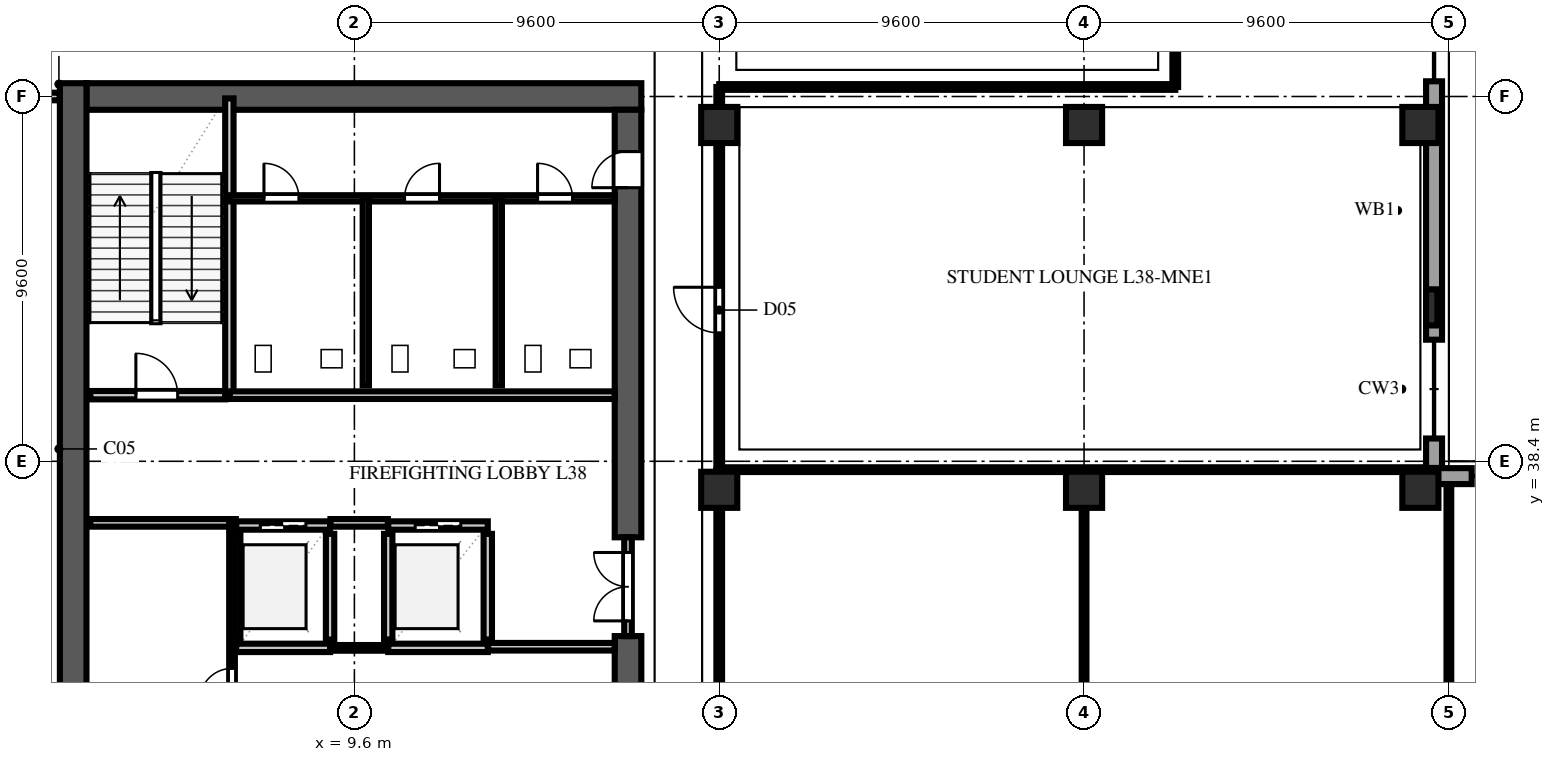
"""IFC4 building model, lengths in metres.
Left out: names, types, materials, properties, quantities, classifications, styles, units other than length and angle.
Written with IfcOpenShell. Run it as: python <this file> out.ifc"""

import sys

from ifc_helpers import new_model, si_unit, direction, frame, frame_2d, origin, origin_2d, place, context, subcontext, project, spatial, rectangle, extrude, element, fill, save


model = new_model("IFC4")
c1 = context("Model", 3, precision=1e-05, world=origin(), true_north=direction((0.0, 1.0)))
c2 = subcontext(c1, "Body", "Model", "MODEL_VIEW")
j1 = project(units=[si_unit("LENGTHUNIT", "METRE"), si_unit("PLANEANGLEUNIT", "RADIAN")], contexts=[c1])
p1 = place(None, origin())
s1 = spatial("IfcSite", under=j1, at=p1, CompositionType="ELEMENT")
p2 = place(p1, origin())
s2 = spatial("IfcBuilding", under=s1, at=p2, CompositionType="ELEMENT")
p3 = place(p2, frame((0.0, 0.0, 150.8)))
s3 = spatial("IfcBuildingStorey", under=s2, at=p3, CompositionType="ELEMENT", Elevation=150.8)
p4 = place(p3, frame((2.55, 48.0, 0.0), z_axis=(0.0, 0.0, 1.0), x_axis=(1.0, 0.0, 0.0)))
e1 = element("IfcWall", 1, at=p4, inside=s3, PredefinedType="SHEAR", context=c2, shape_type="SweptSolid", body=[
    extrude(rectangle(XDim=14.6, YDim=0.7, at=frame_2d((7.3, 0.0))), origin(), (0.0, 0.0, 1.0), 4.94),
])
p5 = place(p3, frame((2.2, 9.25, 0.0), z_axis=(0.0, 0.0, 1.0), x_axis=(0.0, 1.0, 0.0)))
e2 = element("IfcWall", 2, at=p5, inside=s3, PredefinedType="SHEAR", context=c2, shape_type="SweptSolid", body=[
    extrude(rectangle(XDim=39.1, YDim=0.7, at=frame_2d((19.55, 0.0))), origin(), (0.0, 0.0, 1.0), 4.94),
])
p6 = place(p3, frame((16.8, 26.0, 0.0), z_axis=(0.0, 0.0, 1.0), x_axis=(0.0, 1.0, 0.0)))
e3 = element("IfcWall", 3, at=p6, inside=s3, PredefinedType="SHEAR", context=c2, shape_type="SweptSolid", body=[
    extrude(rectangle(XDim=7.8, YDim=0.7, at=frame_2d((3.9, 0.0))), origin(), (0.0, 0.0, 1.0), 4.94),
])
p7 = place(p3, frame((16.8, 36.4, 0.0), z_axis=(0.0, 0.0, 1.0), x_axis=(0.0, 1.0, 0.0)))
e4 = element("IfcWall", 4, at=p7, inside=s3, PredefinedType="SHEAR", context=c2, shape_type="SweptSolid", body=[
    extrude(rectangle(XDim=11.25, YDim=0.7, at=frame_2d((5.625, 0.0))), origin(), (0.0, 0.0, 1.0), 4.94),
])
p8 = place(p7, frame((9.2, 0.0, 0.0)))
e5 = element("IfcOpeningElement", 5, at=p8, cuts=e4, PredefinedType="OPENING", context=c2, shape_type="SweptSolid", body=[
    extrude(rectangle(XDim=0.95, YDim=2.15, at=frame_2d((0.475, 1.075))), frame((0.0, 0.362, 0.0), z_axis=(0.0, -1.0, 0.0), x_axis=(1.0, 0.0, 0.0)), (0.0, 0.0, 1.0), 0.724),
])
for number, where, z_axis, x_axis in (
    (6, (19.2, 37.65, 0.0), (0.0, 0.0, 1.0), (1.0, 0.0, 0.0)),
    (7, (19.2, 47.25, 0.0), (0.0, 0.0, 1.0), (1.0, 0.0, 0.0)),
    (8, (28.8, 37.65, 0.0), (0.0, 0.0, 1.0), (1.0, 0.0, 0.0)),
    (9, (28.8, 47.25, 0.0), (0.0, 0.0, 1.0), (1.0, 0.0, 0.0)),
    (10, (37.65, 37.65, 0.0), (0.0, 0.0, 1.0), (1.0, 0.0, 0.0)),
    (11, (37.65, 47.25, 0.0), (0.0, 0.0, 1.0), (1.0, 0.0, 0.0)),
):
    element("IfcColumn", number, at=place(p3, frame(where, z_axis=z_axis, x_axis=x_axis)), inside=s3, PredefinedType="COLUMN", context=c2, shape_type="SweptSolid", body=[
        extrude(rectangle(XDim=0.95, YDim=0.95, at=origin_2d()), origin(), (0.0, 0.0, 1.0), 5.2),
    ])
p9 = place(p3, frame((37.95, 42.45, 0.0), z_axis=(0.0, 0.0, 1.0), x_axis=(0.0, 1.0, 0.0)))
e12 = element("IfcColumn", 12, at=p9, inside=s3, PredefinedType="PILASTER", context=c2, shape_type="SweptSolid", body=[
    extrude(rectangle(XDim=0.95, YDim=0.3, at=origin_2d()), origin(), (0.0, 0.0, 1.0), 5.2),
])
p10 = place(p3, frame((39.0, 38.01, 0.0), z_axis=(0.0, 0.0, 1.0), x_axis=(-1.0, 0.0, 0.0)))
e13 = element("IfcWall", 13, at=p10, inside=s3, PredefinedType="SOLIDWALL", context=c2, shape_type="SweptSolid", body=[
    extrude(rectangle(XDim=1.2, YDim=0.42, at=frame_2d((0.6, 0.0))), origin(), (0.0, 0.0, 1.0), 4.94),
])
p11 = place(p3, frame((38.01, 38.225, 0.0), z_axis=(0.0, 0.0, 1.0), x_axis=(0.0, 1.0, 0.0)))
e14 = element("IfcWall", 14, at=p11, inside=s3, PredefinedType="SOLIDWALL", context=c2, shape_type="SweptSolid", body=[
    extrude(rectangle(XDim=0.775, YDim=0.42, at=frame_2d((0.387, 0.0))), origin(), (0.0, 0.0, 1.0), 4.94),
])
p12 = place(p3, frame((38.01, 41.6, 0.0), z_axis=(0.0, 0.0, 1.0), x_axis=(0.0, 1.0, 0.0)))
e15 = element("IfcWall", 15, at=p12, inside=s3, PredefinedType="SOLIDWALL", context=c2, shape_type="SweptSolid", body=[
    extrude(rectangle(XDim=6.8, YDim=0.42, at=frame_2d((3.4, 0.0))), origin(), (0.0, 0.0, 1.0), 4.94),
])
p13 = place(p3, frame((2.65, 40.14, 0.0), z_axis=(0.0, 0.0, 1.0), x_axis=(1.0, 0.0, 0.0)))
e16 = element("IfcWall", 16, at=p13, inside=s3, PredefinedType="SOLIDWALL", context=c2, shape_type="SweptSolid", body=[
    extrude(rectangle(XDim=3.55, YDim=0.22, at=frame_2d((1.775, 0.0))), origin(), (0.0, 0.0, 1.0), 4.94),
])
p14 = place(p13, frame((1.2, 0.0, 0.0)))
e17 = element("IfcOpeningElement", 17, at=p14, cuts=e16, PredefinedType="OPENING", context=c2, shape_type="SweptSolid", body=[
    extrude(rectangle(XDim=1.1, YDim=2.2, at=frame_2d((0.55, 1.1))), frame((0.0, 0.122, 0.0), z_axis=(0.0, -1.0, 0.0), x_axis=(1.0, 0.0, 0.0)), (0.0, 0.0, 1.0), 0.244),
])
p15 = place(p3, frame((6.31, 40.14, 0.0), z_axis=(0.0, 0.0, 1.0), x_axis=(0.0, 1.0, 0.0)))
e18 = element("IfcWall", 18, at=p15, inside=s3, PredefinedType="SOLIDWALL", context=c2, shape_type="SweptSolid", body=[
    extrude(rectangle(XDim=7.81, YDim=0.22, at=frame_2d((3.905, 0.0))), origin(), (0.0, 0.0, 1.0), 4.94),
])
for number, where, z_axis, x_axis in (
    (19, (6.49, 33.71, 0.0), (0.0, 0.0, 1.0), (0.0, 1.0, 0.0)),
    (20, (8.96, 33.71, 0.0), (0.0, 0.0, 1.0), (0.0, 1.0, 0.0)),
):
    element("IfcWall", number, at=place(p3, frame(where, z_axis=z_axis, x_axis=x_axis)), inside=s3, PredefinedType="SOLIDWALL", context=c2, shape_type="SweptSolid", body=[
        extrude(rectangle(XDim=2.78, YDim=0.22, at=frame_2d((1.39, 0.0))), origin(), (0.0, 0.0, 1.0), 4.94),
    ])
p16 = place(p3, frame((6.49, 33.49, 0.0), z_axis=(0.0, 0.0, 1.0), x_axis=(1.0, 0.0, 0.0)))
e21 = element("IfcWall", 21, at=p16, inside=s3, PredefinedType="SOLIDWALL", context=c2, shape_type="SweptSolid", body=[
    extrude(rectangle(XDim=2.47, YDim=0.22, at=frame_2d((1.235, 0.0))), origin(), (0.0, 0.0, 1.0), 4.94),
])
p17 = place(p3, frame((6.49, 36.71, 0.0), z_axis=(0.0, 0.0, 1.0), x_axis=(1.0, 0.0, 0.0)))
e22 = element("IfcWall", 22, at=p17, inside=s3, PredefinedType="SOLIDWALL", context=c2, shape_type="SweptSolid", body=[
    extrude(rectangle(XDim=2.47, YDim=0.22, at=frame_2d((1.235, 0.0))), origin(), (0.0, 0.0, 1.0), 4.94),
])
p18 = place(p17, frame((0.635, 0.0, 0.0)))
e23 = element("IfcOpeningElement", 23, at=p18, cuts=e22, PredefinedType="OPENING", context=c2, shape_type="SweptSolid", body=[
    extrude(rectangle(XDim=1.2, YDim=2.2, at=frame_2d((0.6, 1.1))), frame((0.0, 0.122, 0.0), z_axis=(0.0, -1.0, 0.0), x_axis=(1.0, 0.0, 0.0)), (0.0, 0.0, 1.0), 0.244),
])
for number, where, z_axis, x_axis in (
    (24, (10.49, 33.71, 0.0), (0.0, 0.0, 1.0), (0.0, 1.0, 0.0)),
    (25, (13.11, 33.71, 0.0), (0.0, 0.0, 1.0), (0.0, 1.0, 0.0)),
):
    element("IfcWall", number, at=place(p3, frame(where, z_axis=z_axis, x_axis=x_axis)), inside=s3, PredefinedType="SOLIDWALL", context=c2, shape_type="SweptSolid", body=[
        extrude(rectangle(XDim=2.78, YDim=0.22, at=frame_2d((1.39, 0.0))), origin(), (0.0, 0.0, 1.0), 4.94),
    ])
p19 = place(p3, frame((10.49, 33.49, 0.0), z_axis=(0.0, 0.0, 1.0), x_axis=(1.0, 0.0, 0.0)))
e26 = element("IfcWall", 26, at=p19, inside=s3, PredefinedType="SOLIDWALL", context=c2, shape_type="SweptSolid", body=[
    extrude(rectangle(XDim=2.62, YDim=0.22, at=frame_2d((1.31, 0.0))), origin(), (0.0, 0.0, 1.0), 4.94),
])
p20 = place(p3, frame((10.49, 36.71, 0.0), z_axis=(0.0, 0.0, 1.0), x_axis=(1.0, 0.0, 0.0)))
e27 = element("IfcWall", 27, at=p20, inside=s3, PredefinedType="SOLIDWALL", context=c2, shape_type="SweptSolid", body=[
    extrude(rectangle(XDim=2.62, YDim=0.22, at=frame_2d((1.31, 0.0))), origin(), (0.0, 0.0, 1.0), 4.94),
])
p21 = place(p20, frame((0.71, 0.0, 0.0)))
e28 = element("IfcOpeningElement", 28, at=p21, cuts=e27, PredefinedType="OPENING", context=c2, shape_type="SweptSolid", body=[
    extrude(rectangle(XDim=1.2, YDim=2.2, at=frame_2d((0.6, 1.1))), frame((0.0, 0.122, 0.0), z_axis=(0.0, -1.0, 0.0), x_axis=(1.0, 0.0, 0.0)), (0.0, 0.0, 1.0), 0.244),
])
p22 = place(p3, frame((2.65, 36.78, 0.0), z_axis=(0.0, 0.0, 1.0), x_axis=(1.0, 0.0, 0.0)))
e29 = element("IfcWall", 29, at=p22, inside=s3, PredefinedType="SOLIDWALL", context=c2, shape_type="SweptSolid", body=[
    extrude(rectangle(XDim=3.83, YDim=0.2, at=frame_2d((1.915, 0.0))), origin(), (0.0, 0.0, 1.0), 4.94),
])
p23 = place(p3, frame((8.97, 36.78, 0.0), z_axis=(0.0, 0.0, 1.0), x_axis=(1.0, 0.0, 0.0)))
e30 = element("IfcWall", 30, at=p23, inside=s3, PredefinedType="SOLIDWALL", context=c2, shape_type="SweptSolid", body=[
    extrude(rectangle(XDim=1.51, YDim=0.2, at=frame_2d((0.755, 0.0))), origin(), (0.0, 0.0, 1.0), 4.94),
])
p24 = place(p3, frame((13.12, 33.52, 0.0), z_axis=(0.0, 0.0, 1.0), x_axis=(1.0, 0.0, 0.0)))
e31 = element("IfcWall", 31, at=p24, inside=s3, PredefinedType="SOLIDWALL", context=c2, shape_type="SweptSolid", body=[
    extrude(rectangle(XDim=3.33, YDim=0.2, at=frame_2d((1.665, 0.0))), origin(), (0.0, 0.0, 1.0), 4.94),
])
p25 = place(p3, frame((6.32, 40.14, 0.0), z_axis=(0.0, 0.0, 1.0), x_axis=(1.0, 0.0, 0.0)))
e32 = element("IfcWall", 32, at=p25, inside=s3, PredefinedType="SOLIDWALL", context=c2, shape_type="SweptSolid", body=[
    extrude(rectangle(XDim=10.13, YDim=0.2, at=frame_2d((5.065, 0.0))), origin(), (0.0, 0.0, 1.0), 4.94),
])
p26 = place(p3, frame((16.8, 33.8, 0.0), z_axis=(0.0, 0.0, 1.0), x_axis=(0.0, 1.0, 0.0)))
e33 = element("IfcWall", 33, at=p26, inside=s3, PredefinedType="SOLIDWALL", context=c2, shape_type="SweptSolid", body=[
    extrude(rectangle(XDim=2.6, YDim=0.2, at=frame_2d((1.3, 0.0))), origin(), (0.0, 0.0, 1.0), 4.94),
])
p27 = place(p26, frame((0.4, 0.0, 0.0)))
e34 = element("IfcOpeningElement", 34, at=p27, cuts=e33, PredefinedType="OPENING", context=c2, shape_type="SweptSolid", body=[
    extrude(rectangle(XDim=1.8, YDim=2.2, at=frame_2d((0.9, 1.1))), frame((0.0, 0.112, 0.0), z_axis=(0.0, -1.0, 0.0), x_axis=(1.0, 0.0, 0.0)), (0.0, 0.0, 1.0), 0.224),
])
p28 = place(p3, frame((8.965, 33.49, 0.0), z_axis=(0.0, 0.0, 1.0), x_axis=(1.0, 0.0, 0.0)))
e35 = element("IfcWall", 35, at=p28, inside=s3, PredefinedType="PARTITIONING", context=c2, shape_type="SweptSolid", body=[
    extrude(rectangle(XDim=1.52, YDim=0.15, at=frame_2d((0.76, 0.0))), origin(), (0.0, 0.0, 1.0), 4.94),
])
p29 = place(p3, frame((6.38, 17.8, 0.0), z_axis=(0.0, 0.0, 1.0), x_axis=(0.0, 1.0, 0.0)))
e36 = element("IfcWall", 36, at=p29, inside=s3, PredefinedType="PARTITIONING", context=c2, shape_type="SweptSolid", body=[
    extrude(rectangle(XDim=18.98, YDim=0.15, at=frame_2d((9.49, 0.0))), origin(), (0.0, 0.0, 1.0), 4.94),
])
p30 = place(p29, frame((14.3, 0.0, 0.0)))
e37 = element("IfcOpeningElement", 37, at=p30, cuts=e36, PredefinedType="OPENING", context=c2, shape_type="SweptSolid", body=[
    extrude(rectangle(XDim=0.85, YDim=2.1, at=frame_2d((0.425, 1.05))), frame((0.0, 0.087, 0.0), z_axis=(0.0, -1.0, 0.0), x_axis=(1.0, 0.0, 0.0)), (0.0, 0.0, 1.0), 0.174),
])
p31 = place(p3, frame((6.32, 45.32, 0.0), z_axis=(0.0, 0.0, 1.0), x_axis=(1.0, 0.0, 0.0)))
e38 = element("IfcWall", 38, at=p31, inside=s3, PredefinedType="PLUMBINGWALL", context=c2, shape_type="SweptSolid", body=[
    extrude(rectangle(XDim=10.13, YDim=0.165, at=frame_2d((5.065, 0.0))), origin(), (0.0, 0.0, 1.0), 4.94),
])
p32 = place(p31, frame((0.9, 0.0, 0.0)))
e39 = element("IfcOpeningElement", 39, at=p32, cuts=e38, PredefinedType="OPENING", context=c2, shape_type="SweptSolid", body=[
    extrude(rectangle(XDim=0.92, YDim=2.15, at=frame_2d((0.46, 1.075))), frame((0.0, 0.094, 0.0), z_axis=(0.0, -1.0, 0.0), x_axis=(1.0, 0.0, 0.0)), (0.0, 0.0, 1.0), 0.189),
])
p33 = place(p31, frame((4.6, 0.0, 0.0)))
e40 = element("IfcOpeningElement", 40, at=p33, cuts=e38, PredefinedType="OPENING", context=c2, shape_type="SweptSolid", body=[
    extrude(rectangle(XDim=0.92, YDim=2.15, at=frame_2d((0.46, 1.075))), frame((0.0, 0.094, 0.0), z_axis=(0.0, -1.0, 0.0), x_axis=(1.0, 0.0, 0.0)), (0.0, 0.0, 1.0), 0.189),
])
p34 = place(p31, frame((8.1, 0.0, 0.0)))
e41 = element("IfcOpeningElement", 41, at=p34, cuts=e38, PredefinedType="OPENING", context=c2, shape_type="SweptSolid", body=[
    extrude(rectangle(XDim=0.92, YDim=2.15, at=frame_2d((0.46, 1.075))), frame((0.0, 0.094, 0.0), z_axis=(0.0, -1.0, 0.0), x_axis=(1.0, 0.0, 0.0)), (0.0, 0.0, 1.0), 0.189),
])
for number, where, z_axis, x_axis in (
    (42, (9.9, 40.4, 0.0), (0.0, 0.0, 1.0), (0.0, 1.0, 0.0)),
    (43, (13.4, 40.4, 0.0), (0.0, 0.0, 1.0), (0.0, 1.0, 0.0)),
):
    element("IfcWall", number, at=place(p3, frame(where, z_axis=z_axis, x_axis=x_axis)), inside=s3, PredefinedType="PLUMBINGWALL", context=c2, shape_type="SweptSolid", body=[
        extrude(rectangle(XDim=4.92, YDim=0.165, at=frame_2d((2.46, 0.0))), origin(), (0.0, 0.0, 1.0), 4.94),
    ])
p35 = place(p3, frame((0.85, 48.0, 0.0), z_axis=(0.0, 0.0, 1.0), x_axis=(1.0, 0.0, 0.0)))
e44 = element("IfcWall", 44, at=p35, inside=s3, PredefinedType="SOLIDWALL", context=c2, shape_type="SweptSolid", body=[
    extrude(rectangle(XDim=0.995, YDim=0.2, at=frame_2d((0.498, 0.0))), origin(), (0.0, 0.0, 1.0), 4.94),
])
p36 = place(p3, frame((28.8, 20.95, 0.0), z_axis=(0.0, 0.0, 1.0), x_axis=(0.0, 1.0, 0.0)))
e45 = element("IfcWall", 45, at=p36, inside=s3, PredefinedType="PARTITIONING", context=c2, shape_type="SweptSolid", body=[
    extrude(rectangle(XDim=17.23, YDim=0.125, at=frame_2d((8.615, 0.0))), origin(), (0.0, 0.0, 1.0), 4.245),
])
p37 = place(p3, frame((38.4, 20.95, 0.0), z_axis=(0.0, 0.0, 1.0), x_axis=(0.0, 1.0, 0.0)))
e46 = element("IfcWall", 46, at=p37, inside=s3, PredefinedType="PARTITIONING", context=c2, shape_type="SweptSolid", body=[
    extrude(rectangle(XDim=16.84, YDim=0.125, at=frame_2d((8.42, 0.0))), origin(), (0.0, 0.0, 1.0), 4.94),
])
p38 = place(p3, frame((19.2, 20.95, 0.0), z_axis=(0.0, 0.0, 1.0), x_axis=(0.0, 1.0, 0.0)))
e47 = element("IfcWall", 47, at=p38, inside=s3, PredefinedType="PARTITIONING", context=c2, shape_type="SweptSolid", body=[
    extrude(rectangle(XDim=17.23, YDim=0.15, at=frame_2d((8.615, 0.0))), origin(), (0.0, 0.0, 1.0), 4.245),
])
p39 = place(p3, frame((19.28, 38.18, 0.0), z_axis=(0.0, 0.0, 1.0), x_axis=(1.0, 0.0, 0.0)))
e48 = element("IfcWall", 48, at=p39, inside=s3, PredefinedType="PARTITIONING", context=c2, shape_type="SweptSolid", body=[
    extrude(rectangle(XDim=18.37, YDim=0.125, at=frame_2d((9.185, 0.0))), origin(), (0.0, 0.0, 1.0), 4.94),
])
p40 = place(p3, frame((19.2, 38.18, 0.0), z_axis=(0.0, 0.0, 1.0), x_axis=(0.0, 1.0, 0.0)))
e49 = element("IfcWall", 49, at=p40, inside=s3, PredefinedType="PARTITIONING", context=c2, shape_type="SweptSolid", body=[
    extrude(rectangle(XDim=10.07, YDim=0.15, at=frame_2d((5.035, 0.0))), origin(), (0.0, 0.0, 1.0), 4.245),
])
p41 = place(p40, frame((3.6, 0.0, 0.0)))
e50 = element("IfcOpeningElement", 50, at=p41, cuts=e49, PredefinedType="OPENING", context=c2, shape_type="SweptSolid", body=[
    extrude(rectangle(XDim=1.2, YDim=2.2, at=frame_2d((0.6, 1.1))), frame((0.0, 0.087, 0.0), z_axis=(0.0, -1.0, 0.0), x_axis=(1.0, 0.0, 0.0)), (0.0, 0.0, 1.0), 0.174),
])
p42 = place(p3, frame((19.2, 48.25, 0.0), z_axis=(0.0, 0.0, 1.0), x_axis=(1.0, 0.0, 0.0)))
e51 = element("IfcWall", 51, at=p42, inside=s3, PredefinedType="PARTITIONING", context=c2, shape_type="SweptSolid", body=[
    extrude(rectangle(XDim=12.0, YDim=0.15, at=frame_2d((6.0, 0.0))), origin(), (0.0, 0.0, 1.0), 4.94),
])
p43 = place(p3, frame((31.2, 48.25, 0.0), z_axis=(0.0, 0.0, 1.0), x_axis=(0.0, 1.0, 0.0)))
e52 = element("IfcWall", 52, at=p43, inside=s3, PredefinedType="PARTITIONING", context=c2, shape_type="SweptSolid", body=[
    extrude(rectangle(XDim=18.73, YDim=0.15, at=frame_2d((9.365, 0.0))), origin(), (0.0, 0.0, 1.0), 4.94),
])
p44 = place(p43, frame((3.4, 0.0, 0.0)))
e53 = element("IfcOpeningElement", 53, at=p44, cuts=e52, PredefinedType="OPENING", context=c2, shape_type="SweptSolid", body=[
    extrude(rectangle(XDim=0.95, YDim=2.15, at=frame_2d((0.475, 1.075))), frame((0.0, 0.087, 0.0), z_axis=(0.0, -1.0, 0.0), x_axis=(1.0, 0.0, 0.0)), (0.0, 0.0, 1.0), 0.174),
])
p45 = place(p14, origin())
e54 = element("IfcDoor", 54, at=p45, inside=s3, OperationType="SINGLE_SWING_LEFT", PredefinedType="DOOR", context=c2, shape_type="SweptSolid", body=[
    extrude(rectangle(XDim=1.1, YDim=2.2, at=frame_2d((0.55, 1.1))), frame((0.0, 0.025, 0.0), z_axis=(0.0, -1.0, 0.0), x_axis=(1.0, 0.0, 0.0)), (0.0, 0.0, 1.0), 0.05),
])
fill(e17, e54)
p46 = place(p18, origin())
e55 = element("IfcDoor", 55, at=p46, inside=s3, OperationType="DOUBLE_DOOR_SLIDING", PredefinedType="DOOR", context=c2, shape_type="SweptSolid", body=[
    extrude(rectangle(XDim=1.2, YDim=2.2, at=frame_2d((0.6, 1.1))), frame((0.0, 0.025, 0.0), z_axis=(0.0, -1.0, 0.0), x_axis=(1.0, 0.0, 0.0)), (0.0, 0.0, 1.0), 0.05),
])
fill(e23, e55)
p47 = place(p21, origin())
e56 = element("IfcDoor", 56, at=p47, inside=s3, OperationType="DOUBLE_DOOR_SLIDING", PredefinedType="DOOR", context=c2, shape_type="SweptSolid", body=[
    extrude(rectangle(XDim=1.2, YDim=2.2, at=frame_2d((0.6, 1.1))), frame((0.0, 0.025, 0.0), z_axis=(0.0, -1.0, 0.0), x_axis=(1.0, 0.0, 0.0)), (0.0, 0.0, 1.0), 0.05),
])
fill(e28, e56)
p48 = place(p8, origin())
e57 = element("IfcDoor", 57, at=p48, inside=s3, OperationType="SINGLE_SWING_LEFT", PredefinedType="DOOR", context=c2, shape_type="SweptSolid", body=[
    extrude(rectangle(XDim=0.95, YDim=2.15, at=frame_2d((0.475, 1.075))), frame((0.0, 0.025, 0.0), z_axis=(0.0, -1.0, 0.0), x_axis=(1.0, 0.0, 0.0)), (0.0, 0.0, 1.0), 0.05),
])
fill(e5, e57)
p49 = place(p27, origin())
e58 = element("IfcDoor", 58, at=p49, inside=s3, OperationType="DOUBLE_DOOR_SINGLE_SWING", PredefinedType="DOOR", context=c2, shape_type="SweptSolid", body=[
    extrude(rectangle(XDim=1.8, YDim=2.2, at=frame_2d((0.9, 1.1))), frame((0.0, 0.025, 0.0), z_axis=(0.0, -1.0, 0.0), x_axis=(1.0, 0.0, 0.0)), (0.0, 0.0, 1.0), 0.05),
])
fill(e34, e58)
p50 = place(p30, origin())
e59 = element("IfcDoor", 59, at=p50, inside=s3, OperationType="SINGLE_SWING_LEFT", PredefinedType="DOOR", context=c2, shape_type="SweptSolid", body=[
    extrude(rectangle(XDim=0.85, YDim=2.1, at=frame_2d((0.425, 1.05))), frame((0.0, 0.025, 0.0), z_axis=(0.0, -1.0, 0.0), x_axis=(1.0, 0.0, 0.0)), (0.0, 0.0, 1.0), 0.05),
])
fill(e37, e59)
p51 = place(p32, origin())
e60 = element("IfcDoor", 60, at=p51, inside=s3, OperationType="SINGLE_SWING_LEFT", PredefinedType="DOOR", context=c2, shape_type="SweptSolid", body=[
    extrude(rectangle(XDim=0.92, YDim=2.15, at=frame_2d((0.46, 1.075))), frame((0.0, 0.025, 0.0), z_axis=(0.0, -1.0, 0.0), x_axis=(1.0, 0.0, 0.0)), (0.0, 0.0, 1.0), 0.05),
])
fill(e39, e60)
p52 = place(p33, origin())
e61 = element("IfcDoor", 61, at=p52, inside=s3, OperationType="SINGLE_SWING_RIGHT", PredefinedType="DOOR", context=c2, shape_type="SweptSolid", body=[
    extrude(rectangle(XDim=0.92, YDim=2.15, at=frame_2d((0.46, 1.075))), frame((0.0, 0.025, 0.0), z_axis=(0.0, -1.0, 0.0), x_axis=(1.0, 0.0, 0.0)), (0.0, 0.0, 1.0), 0.05),
])
fill(e40, e61)
p53 = place(p34, origin())
e62 = element("IfcDoor", 62, at=p53, inside=s3, OperationType="SINGLE_SWING_LEFT", PredefinedType="DOOR", context=c2, shape_type="SweptSolid", body=[
    extrude(rectangle(XDim=0.92, YDim=2.15, at=frame_2d((0.46, 1.075))), frame((0.0, 0.025, 0.0), z_axis=(0.0, -1.0, 0.0), x_axis=(1.0, 0.0, 0.0)), (0.0, 0.0, 1.0), 0.05),
])
fill(e41, e62)
p54 = place(p41, origin())
e63 = element("IfcDoor", 63, at=p54, inside=s3, OperationType="SINGLE_SWING_RIGHT", PredefinedType="DOOR", context=c2, shape_type="SweptSolid", body=[
    extrude(rectangle(XDim=1.2, YDim=2.2, at=frame_2d((0.6, 1.1))), frame((0.0, 0.025, 0.0), z_axis=(0.0, -1.0, 0.0), x_axis=(1.0, 0.0, 0.0)), (0.0, 0.0, 1.0), 0.05),
])
fill(e50, e63)
save(model, sys.argv[1])
